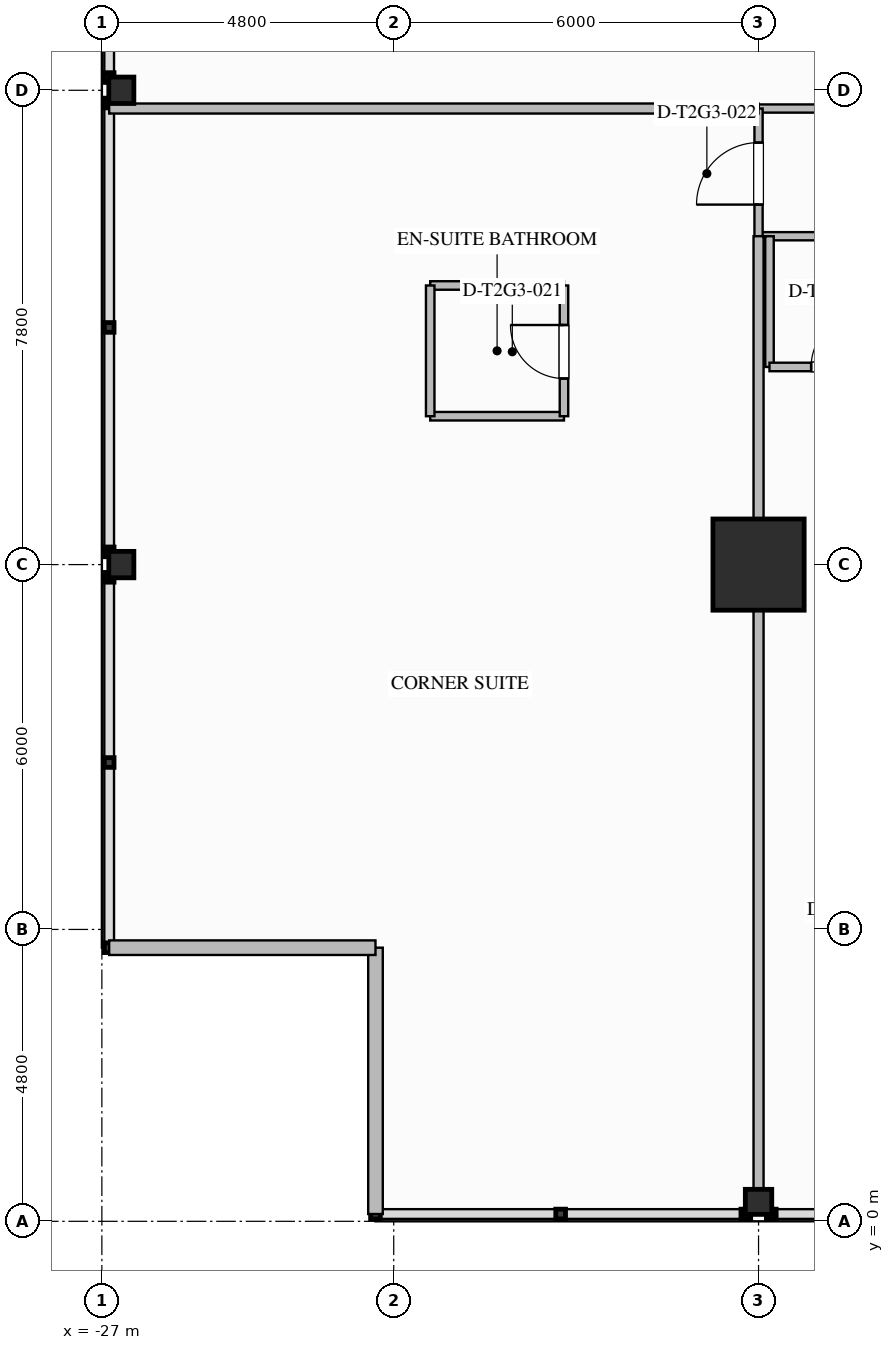
"""IFC4 building model, lengths in metres.
Left out: names, types, materials, properties, quantities, classifications, styles, units other than length and angle.
Written with IfcOpenShell. Run it as: python <this file> out.ifc"""

import sys

from ifc_helpers import new_model, si_unit, direction, frame, frame_2d, origin, origin_2d, place, context, subcontext, project, spatial, rectangle, i_section, extrude, element, fill, save


model = new_model("IFC4")
c1 = context("Model", 3, precision=1e-05, world=origin(), true_north=direction((0.0, 1.0)))
c2 = subcontext(c1, "Body", "Model", "MODEL_VIEW")
j1 = project(units=[si_unit("LENGTHUNIT", "METRE"), si_unit("PLANEANGLEUNIT", "RADIAN")], contexts=[c1])
p1 = place(None, origin())
s1 = spatial("IfcSite", under=j1, at=p1, CompositionType="ELEMENT")
p2 = place(p1, origin())
s2 = spatial("IfcBuilding", under=s1, at=p2, CompositionType="ELEMENT")
p3 = place(p2, frame((0.0, 0.0, 119.8)))
s3 = spatial("IfcBuildingStorey", under=s2, at=p3, CompositionType="ELEMENT", Elevation=119.8)
p4 = place(p3, frame((-16.2, 10.8, 0.0), z_axis=(0.0, 0.0, 1.0), x_axis=(1.0, 0.0, 0.0)))
e1 = element("IfcColumn", 1, at=p4, inside=s3, PredefinedType="COLUMN", context=c2, shape_type="SweptSolid", body=[
    extrude(rectangle(XDim=1.5, YDim=1.5, at=origin_2d()), origin(), (0.0, 0.0, 1.0), 3.5),
])
for number, where, z_axis, x_axis in (
    (2, (-26.68, 10.8, 0.0), (0.0, 0.0, 1.0), (1.0, 0.0, 0.0)),
    (3, (-26.68, 18.6, 0.0), (0.0, 0.0, 1.0), (1.0, 0.0, 0.0)),
    (4, (-16.2, 0.32, 0.0), (0.0, 0.0, 1.0), (0.0, 1.0, 0.0)),
):
    element("IfcColumn", number, at=place(p3, frame(where, z_axis=z_axis, x_axis=x_axis)), inside=s3, PredefinedType="COLUMN", context=c2, shape_type="SweptSolid", body=[
        extrude(i_section(OverallWidth=0.412, OverallDepth=0.435, WebThickness=0.036, FlangeThickness=0.057, FilletRadius=0.028, at=origin_2d()), origin(), (0.0, 0.0, 1.0), 3.497),
    ])
for number, where, z_axis, x_axis in (
    (5, (-22.5, 0.12, 0.0), (0.0, 0.0, 1.0), (0.0, 1.0, 0.0)),
    (6, (-22.5, 4.5, 0.0), (0.0, 0.0, 1.0), (-1.0, 0.0, 0.0)),
):
    element("IfcWall", number, at=place(p3, frame(where, z_axis=z_axis, x_axis=x_axis)), inside=s3, PredefinedType="STANDARD", context=c2, shape_type="SweptSolid", body=[
        extrude(rectangle(XDim=4.38, YDim=0.24, at=frame_2d((2.19, 0.0))), origin(), (0.0, 0.0, 1.0), 3.24),
    ])
p5 = place(p3, frame((-16.2, 18.3, 0.0), z_axis=(0.0, 0.0, 1.0), x_axis=(1.0, 0.0, 0.0)))
e7 = element("IfcWall", 7, at=p5, inside=s3, PredefinedType="PARTITIONING", context=c2, shape_type="SweptSolid", body=[
    extrude(rectangle(XDim=5.4, YDim=0.135, at=frame_2d((2.7, 0.0))), origin(), (0.0, 0.0, 1.0), 3.24),
])
p6 = place(p3, frame((-16.2, 16.2, 0.0), z_axis=(0.0, 0.0, 1.0), x_axis=(1.0, 0.0, 0.0)))
e8 = element("IfcWall", 8, at=p6, inside=s3, PredefinedType="PARTITIONING", context=c2, shape_type="SweptSolid", body=[
    extrude(rectangle(XDim=24.9, YDim=0.135, at=frame_2d((12.45, 0.0))), origin(), (0.0, 0.0, 1.0), 3.24),
])
p7 = place(p6, frame((3.225, 0.0, 0.0)))
e9 = element("IfcOpeningElement", 9, at=p7, cuts=e8, PredefinedType="OPENING", context=c2, shape_type="SweptSolid", body=[
    extrude(rectangle(XDim=0.96, YDim=2.15, at=frame_2d((0.48, 1.075))), frame((0.0, 0.077, 0.0), z_axis=(0.0, -1.0, 0.0), x_axis=(1.0, 0.0, 0.0)), (0.0, 0.0, 1.0), 0.155),
])
p8 = place(p6, frame((8.205, 0.0, 0.0)))
e10 = element("IfcOpeningElement", 10, at=p8, cuts=e8, PredefinedType="OPENING", context=c2, shape_type="SweptSolid", body=[
    extrude(rectangle(XDim=1.02, YDim=2.15, at=frame_2d((0.51, 1.075))), frame((0.0, 0.077, 0.0), z_axis=(0.0, -1.0, 0.0), x_axis=(1.0, 0.0, 0.0)), (0.0, 0.0, 1.0), 0.155),
])
p9 = place(p6, frame((15.774, 0.0, 0.0)))
e11 = element("IfcOpeningElement", 11, at=p9, cuts=e8, PredefinedType="OPENING", context=c2, shape_type="SweptSolid", body=[
    extrude(rectangle(XDim=1.26, YDim=2.2, at=frame_2d((0.63, 1.1))), frame((0.0, 0.077, 0.0), z_axis=(0.0, -1.0, 0.0), x_axis=(1.0, 0.0, 0.0)), (0.0, 0.0, 1.0), 0.155),
])
p10 = place(p6, frame((20.904, 0.0, 0.0)))
e12 = element("IfcOpeningElement", 12, at=p10, cuts=e8, PredefinedType="OPENING", context=c2, shape_type="SweptSolid", body=[
    extrude(rectangle(XDim=1.02, YDim=2.15, at=frame_2d((0.51, 1.075))), frame((0.0, 0.077, 0.0), z_axis=(0.0, -1.0, 0.0), x_axis=(1.0, 0.0, 0.0)), (0.0, 0.0, 1.0), 0.155),
])
p11 = place(p3, frame((-16.2, 16.2, 0.0), z_axis=(0.0, 0.0, 1.0), x_axis=(0.0, 1.0, 0.0)))
e13 = element("IfcWall", 13, at=p11, inside=s3, PredefinedType="PARTITIONING", context=c2, shape_type="SweptSolid", body=[
    extrude(rectangle(XDim=2.1, YDim=0.135, at=frame_2d((1.05, 0.0))), origin(), (0.0, 0.0, 1.0), 2.53),
])
p12 = place(p11, frame((0.52, 0.0, 0.0)))
e14 = element("IfcOpeningElement", 14, at=p12, cuts=e13, PredefinedType="OPENING", context=c2, shape_type="SweptSolid", body=[
    extrude(rectangle(XDim=1.02, YDim=2.15, at=frame_2d((0.51, 1.075))), frame((0.0, 0.077, 0.0), z_axis=(0.0, -1.0, 0.0), x_axis=(1.0, 0.0, 0.0)), (0.0, 0.0, 1.0), 0.155),
])
p13 = place(p3, frame((-16.2, 0.12, 0.0), z_axis=(0.0, 0.0, 1.0), x_axis=(0.0, 1.0, 0.0)))
e15 = element("IfcWall", 15, at=p13, inside=s3, PredefinedType="PARTITIONING", context=c2, shape_type="SweptSolid", body=[
    extrude(rectangle(XDim=16.08, YDim=0.165, at=frame_2d((8.04, 0.0))), origin(), (0.0, 0.0, 1.0), 2.53),
])
p14 = place(p3, frame((-26.88, 18.3, 0.0), z_axis=(0.0, 0.0, 1.0), x_axis=(1.0, 0.0, 0.0)))
e16 = element("IfcWall", 16, at=p14, inside=s3, PredefinedType="PARTITIONING", context=c2, shape_type="SweptSolid", body=[
    extrude(rectangle(XDim=10.68, YDim=0.165, at=frame_2d((5.34, 0.0))), origin(), (0.0, 0.0, 1.0), 2.53),
])
for number, where, z_axis, x_axis in (
    (17, (-21.6, 13.24, 0.0), (0.0, 0.0, 1.0), (1.0, 0.0, 0.0)),
    (18, (-21.6, 15.39, 0.0), (0.0, 0.0, 1.0), (1.0, 0.0, 0.0)),
):
    element("IfcWall", number, at=place(p3, frame(where, z_axis=z_axis, x_axis=x_axis)), inside=s3, PredefinedType="PLUMBINGWALL", context=c2, shape_type="SweptSolid", body=[
        extrude(rectangle(XDim=2.2, YDim=0.14, at=frame_2d((1.1, 0.0))), origin(), (0.0, 0.0, 1.0), 3.24),
    ])
p15 = place(p3, frame((-21.6, 13.24, 0.0), z_axis=(0.0, 0.0, 1.0), x_axis=(0.0, 1.0, 0.0)))
e19 = element("IfcWall", 19, at=p15, inside=s3, PredefinedType="PLUMBINGWALL", context=c2, shape_type="SweptSolid", body=[
    extrude(rectangle(XDim=2.15, YDim=0.14, at=frame_2d((1.075, 0.0))), origin(), (0.0, 0.0, 1.0), 3.24),
])
p16 = place(p3, frame((-19.4, 13.24, 0.0), z_axis=(0.0, 0.0, 1.0), x_axis=(0.0, 1.0, 0.0)))
e20 = element("IfcWall", 20, at=p16, inside=s3, PredefinedType="PLUMBINGWALL", context=c2, shape_type="SweptSolid", body=[
    extrude(rectangle(XDim=2.15, YDim=0.14, at=frame_2d((1.075, 0.0))), origin(), (0.0, 0.0, 1.0), 3.24),
])
p17 = place(p16, frame((0.62, 0.0, 0.0)))
e21 = element("IfcOpeningElement", 21, at=p17, cuts=e20, PredefinedType="OPENING", context=c2, shape_type="SweptSolid", body=[
    extrude(rectangle(XDim=0.88, YDim=2.1, at=frame_2d((0.44, 1.05))), frame((0.0, 0.08, 0.0), z_axis=(0.0, -1.0, 0.0), x_axis=(1.0, 0.0, 0.0)), (0.0, 0.0, 1.0), 0.16),
])
p18 = place(p3, frame((-16.02, 16.2, 0.0), z_axis=(0.0, 0.0, 1.0), x_axis=(0.0, -1.0, 0.0)))
e22 = element("IfcWall", 22, at=p18, inside=s3, PredefinedType="PLUMBINGWALL", context=c2, shape_type="SweptSolid", body=[
    extrude(rectangle(XDim=2.15, YDim=0.14, at=frame_2d((1.075, 0.0))), origin(), (0.0, 0.0, 1.0), 2.53),
])
p19 = place(p3, frame((-16.02, 14.05, 0.0), z_axis=(0.0, 0.0, 1.0), x_axis=(1.0, 0.0, 0.0)))
e23 = element("IfcWall", 23, at=p19, inside=s3, PredefinedType="PLUMBINGWALL", context=c2, shape_type="SweptSolid", body=[
    extrude(rectangle(XDim=2.25, YDim=0.14, at=frame_2d((1.125, 0.0))), origin(), (0.0, 0.0, 1.0), 3.24),
])
p20 = place(p19, frame((0.685, 0.0, 0.0)))
e24 = element("IfcOpeningElement", 24, at=p20, cuts=e23, PredefinedType="OPENING", context=c2, shape_type="SweptSolid", body=[
    extrude(rectangle(XDim=0.88, YDim=2.1, at=frame_2d((0.44, 1.05))), frame((0.0, 0.08, 0.0), z_axis=(0.0, -1.0, 0.0), x_axis=(1.0, 0.0, 0.0)), (0.0, 0.0, 1.0), 0.16),
])
p21 = place(p17, origin())
e25 = element("IfcDoor", 25, at=p21, inside=s3, OperationType="SINGLE_SWING_RIGHT", PredefinedType="DOOR", context=c2, shape_type="SweptSolid", body=[
    extrude(rectangle(XDim=0.88, YDim=2.1, at=frame_2d((0.44, 1.05))), frame((0.0, 0.025, 0.0), z_axis=(0.0, -1.0, 0.0), x_axis=(1.0, 0.0, 0.0)), (0.0, 0.0, 1.0), 0.05),
])
fill(e21, e25)
p22 = place(p12, origin())
e26 = element("IfcDoor", 26, at=p22, inside=s3, OperationType="SINGLE_SWING_LEFT", PredefinedType="DOOR", context=c2, shape_type="SweptSolid", body=[
    extrude(rectangle(XDim=1.02, YDim=2.15, at=frame_2d((0.51, 1.075))), frame((0.0, 0.025, 0.0), z_axis=(0.0, -1.0, 0.0), x_axis=(1.0, 0.0, 0.0)), (0.0, 0.0, 1.0), 0.05),
])
fill(e14, e26)
p23 = place(p20, origin())
e27 = element("IfcDoor", 27, at=p23, inside=s3, OperationType="SINGLE_SWING_RIGHT", PredefinedType="DOOR", context=c2, shape_type="SweptSolid", body=[
    extrude(rectangle(XDim=0.88, YDim=2.1, at=frame_2d((0.44, 1.05))), frame((0.0, 0.025, 0.0), z_axis=(0.0, -1.0, 0.0), x_axis=(1.0, 0.0, 0.0)), (0.0, 0.0, 1.0), 0.05),
])
fill(e24, e27)
save(model, sys.argv[1])
